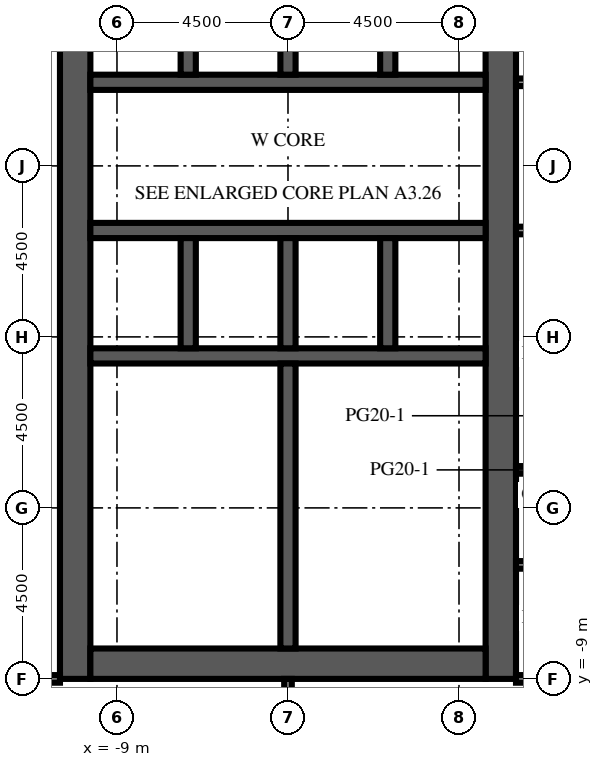
"""IFC4 building model, lengths in metres.
Left out: names, types, materials, properties, quantities, classifications, styles, units other than length and angle.
Written with IfcOpenShell. Run it as: python <this file> out.ifc"""

import sys

from ifc_helpers import new_model, si_unit, direction, frame, frame_2d, origin, place, context, subcontext, project, spatial, rectangle, extrude, element, fill, save


model = new_model("IFC4")
c1 = context("Model", 3, precision=1e-05, world=origin(), true_north=direction((0.0, 1.0)))
c2 = subcontext(c1, "Body", "Model", "MODEL_VIEW")
j1 = project(units=[si_unit("LENGTHUNIT", "METRE"), si_unit("PLANEANGLEUNIT", "RADIAN")], contexts=[c1])
p1 = place(None, origin())
s1 = spatial("IfcSite", under=j1, at=p1, CompositionType="ELEMENT")
p2 = place(p1, origin())
s2 = spatial("IfcBuilding", under=s1, at=p2, CompositionType="ELEMENT")
p3 = place(p2, frame((0.0, 0.0, 173.2)))
s3 = spatial("IfcBuildingStorey", under=s2, at=p3, CompositionType="ELEMENT", Elevation=173.2)
p4 = place(p3, frame((-10.1, -9.0, 0.0), z_axis=(0.0, 0.0, 1.0), x_axis=(0.0, 1.0, 0.0)))
e1 = element("IfcWall", 1, at=p4, inside=s3, PredefinedType="SHEAR", context=c2, shape_type="SweptSolid", body=[
    extrude(rectangle(XDim=27.5, YDim=0.8, at=frame_2d((13.75, 0.0))), origin(), (0.0, 0.0, 1.0), 4.1),
])
p5 = place(p4, frame((12.55, 0.0, 0.0)))
e2 = element("IfcOpeningElement", 2, at=p5, cuts=e1, PredefinedType="OPENING", context=c2, shape_type="SweptSolid", body=[
    extrude(rectangle(XDim=2.4, YDim=2.4, at=frame_2d((1.2, 1.2))), frame((0.0, 0.41, 0.0), z_axis=(0.0, -1.0, 0.0), x_axis=(1.0, 0.0, 0.0)), (0.0, 0.0, 1.0), 0.82),
])
p6 = place(p4, frame((6.825, 0.0, 0.0)))
e3 = element("IfcOpeningElement", 3, at=p6, cuts=e1, PredefinedType="OPENING", context=c2, shape_type="SweptSolid", body=[
    extrude(rectangle(XDim=1.2, YDim=2.1, at=frame_2d((0.6, 1.05))), frame((0.0, 0.41, 0.0), z_axis=(0.0, -1.0, 0.0), x_axis=(1.0, 0.0, 0.0)), (0.0, 0.0, 1.0), 0.82),
])
p7 = place(p4, frame((19.475, 0.0, 0.0)))
e4 = element("IfcOpeningElement", 4, at=p7, cuts=e1, PredefinedType="OPENING", context=c2, shape_type="SweptSolid", body=[
    extrude(rectangle(XDim=1.2, YDim=2.1, at=frame_2d((0.6, 1.05))), frame((0.0, 0.41, 0.0), z_axis=(0.0, -1.0, 0.0), x_axis=(1.0, 0.0, 0.0)), (0.0, 0.0, 1.0), 0.82),
])
p8 = place(p3, frame((1.1, -9.0, 0.0), z_axis=(0.0, 0.0, 1.0), x_axis=(0.0, 1.0, 0.0)))
e5 = element("IfcWall", 5, at=p8, inside=s3, PredefinedType="SHEAR", context=c2, shape_type="SweptSolid", body=[
    extrude(rectangle(XDim=27.5, YDim=0.8, at=frame_2d((13.75, 0.0))), origin(), (0.0, 0.0, 1.0), 4.1),
])
p9 = place(p8, frame((12.55, 0.0, 0.0)))
e6 = element("IfcOpeningElement", 6, at=p9, cuts=e5, PredefinedType="OPENING", context=c2, shape_type="SweptSolid", body=[
    extrude(rectangle(XDim=2.4, YDim=2.4, at=frame_2d((1.2, 1.2))), frame((0.0, 0.41, 0.0), z_axis=(0.0, -1.0, 0.0), x_axis=(1.0, 0.0, 0.0)), (0.0, 0.0, 1.0), 0.82),
])
p10 = place(p8, frame((3.95, 0.0, 0.0)))
e7 = element("IfcOpeningElement", 7, at=p10, cuts=e5, PredefinedType="OPENING", context=c2, shape_type="SweptSolid", body=[
    extrude(rectangle(XDim=1.2, YDim=2.1, at=frame_2d((0.6, 1.05))), frame((0.0, 0.41, 0.0), z_axis=(0.0, -1.0, 0.0), x_axis=(1.0, 0.0, 0.0)), (0.0, 0.0, 1.0), 0.82),
])
p11 = place(p8, frame((22.35, 0.0, 0.0)))
e8 = element("IfcOpeningElement", 8, at=p11, cuts=e5, PredefinedType="OPENING", context=c2, shape_type="SweptSolid", body=[
    extrude(rectangle(XDim=1.2, YDim=2.1, at=frame_2d((0.6, 1.05))), frame((0.0, 0.41, 0.0), z_axis=(0.0, -1.0, 0.0), x_axis=(1.0, 0.0, 0.0)), (0.0, 0.0, 1.0), 0.82),
])
p12 = place(p3, frame((-9.7, -8.6, 0.0), z_axis=(0.0, 0.0, 1.0), x_axis=(1.0, 0.0, 0.0)))
e9 = element("IfcWall", 9, at=p12, inside=s3, PredefinedType="SHEAR", context=c2, shape_type="SweptSolid", body=[
    extrude(rectangle(XDim=10.4, YDim=0.8, at=frame_2d((5.2, 0.0))), origin(), (0.0, 0.0, 1.0), 4.1),
])
p13 = place(p3, frame((-9.7, -0.5, 0.0), z_axis=(0.0, 0.0, 1.0), x_axis=(1.0, 0.0, 0.0)))
e10 = element("IfcWall", 10, at=p13, inside=s3, PredefinedType="SHEAR", context=c2, shape_type="SweptSolid", body=[
    extrude(rectangle(XDim=10.4, YDim=0.4, at=frame_2d((5.2, 0.0))), origin(), (0.0, 0.0, 1.0), 4.1),
])
p14 = place(p3, frame((-9.7, 2.8, 0.0), z_axis=(0.0, 0.0, 1.0), x_axis=(1.0, 0.0, 0.0)))
e11 = element("IfcWall", 11, at=p14, inside=s3, PredefinedType="SHEAR", context=c2, shape_type="SweptSolid", body=[
    extrude(rectangle(XDim=10.4, YDim=0.4, at=frame_2d((5.2, 0.0))), origin(), (0.0, 0.0, 1.0), 4.1),
])
p15 = place(p14, frame((0.738, 0.0, 0.0)))
e12 = element("IfcOpeningElement", 12, at=p15, cuts=e11, PredefinedType="OPENING", context=c2, shape_type="SweptSolid", body=[
    extrude(rectangle(XDim=1.1, YDim=2.1, at=frame_2d((0.55, 1.05))), frame((0.0, 0.21, 0.0), z_axis=(0.0, -1.0, 0.0), x_axis=(1.0, 0.0, 0.0)), (0.0, 0.0, 1.0), 0.42),
])
p16 = place(p14, frame((3.337, 0.0, 0.0)))
e13 = element("IfcOpeningElement", 13, at=p16, cuts=e11, PredefinedType="OPENING", context=c2, shape_type="SweptSolid", body=[
    extrude(rectangle(XDim=1.1, YDim=2.1, at=frame_2d((0.55, 1.05))), frame((0.0, 0.21, 0.0), z_axis=(0.0, -1.0, 0.0), x_axis=(1.0, 0.0, 0.0)), (0.0, 0.0, 1.0), 0.42),
])
p17 = place(p14, frame((6.012, 0.0, 0.0)))
e14 = element("IfcOpeningElement", 14, at=p17, cuts=e11, PredefinedType="OPENING", context=c2, shape_type="SweptSolid", body=[
    extrude(rectangle(XDim=1.0, YDim=2.1, at=frame_2d((0.5, 1.05))), frame((0.0, 0.21, 0.0), z_axis=(0.0, -1.0, 0.0), x_axis=(1.0, 0.0, 0.0)), (0.0, 0.0, 1.0), 0.42),
])
p18 = place(p14, frame((8.613, 0.0, 0.0)))
e15 = element("IfcOpeningElement", 15, at=p18, cuts=e11, PredefinedType="OPENING", context=c2, shape_type="SweptSolid", body=[
    extrude(rectangle(XDim=1.0, YDim=2.1, at=frame_2d((0.5, 1.05))), frame((0.0, 0.21, 0.0), z_axis=(0.0, -1.0, 0.0), x_axis=(1.0, 0.0, 0.0)), (0.0, 0.0, 1.0), 0.42),
])
p19 = place(p3, frame((-9.7, 6.7, 0.0), z_axis=(0.0, 0.0, 1.0), x_axis=(1.0, 0.0, 0.0)))
e16 = element("IfcWall", 16, at=p19, inside=s3, PredefinedType="SHEAR", context=c2, shape_type="SweptSolid", body=[
    extrude(rectangle(XDim=10.4, YDim=0.4, at=frame_2d((5.2, 0.0))), origin(), (0.0, 0.0, 1.0), 4.1),
])
p20 = place(p19, frame((3.337, 0.0, 0.0)))
e17 = element("IfcOpeningElement", 17, at=p20, cuts=e16, PredefinedType="OPENING", context=c2, shape_type="SweptSolid", body=[
    extrude(rectangle(XDim=1.1, YDim=2.1, at=frame_2d((0.55, 1.05))), frame((0.0, 0.21, 0.0), z_axis=(0.0, -1.0, 0.0), x_axis=(1.0, 0.0, 0.0)), (0.0, 0.0, 1.0), 0.42),
])
p21 = place(p19, frame((5.962, 0.0, 0.0)))
e18 = element("IfcOpeningElement", 18, at=p21, cuts=e16, PredefinedType="OPENING", context=c2, shape_type="SweptSolid", body=[
    extrude(rectangle(XDim=1.1, YDim=2.1, at=frame_2d((0.55, 1.05))), frame((0.0, 0.21, 0.0), z_axis=(0.0, -1.0, 0.0), x_axis=(1.0, 0.0, 0.0)), (0.0, 0.0, 1.0), 0.42),
])
p22 = place(p19, frame((8.663, 0.0, 0.0)))
e19 = element("IfcOpeningElement", 19, at=p22, cuts=e16, PredefinedType="OPENING", context=c2, shape_type="SweptSolid", body=[
    extrude(rectangle(XDim=1.1, YDim=2.1, at=frame_2d((0.55, 1.05))), frame((0.0, 0.21, 0.0), z_axis=(0.0, -1.0, 0.0), x_axis=(1.0, 0.0, 0.0)), (0.0, 0.0, 1.0), 0.42),
])
p23 = place(p19, frame((0.688, 0.0, 0.0)))
e20 = element("IfcOpeningElement", 20, at=p23, cuts=e16, PredefinedType="OPENING", context=c2, shape_type="SweptSolid", body=[
    extrude(rectangle(XDim=1.0, YDim=2.1, at=frame_2d((0.5, 1.05))), frame((0.0, 0.21, 0.0), z_axis=(0.0, -1.0, 0.0), x_axis=(1.0, 0.0, 0.0)), (0.0, 0.0, 1.0), 0.42),
])
for number, where, z_axis, x_axis in (
    (21, (-7.125, -0.3, 0.0), (0.0, 0.0, 1.0), (0.0, 1.0, 0.0)),
    (22, (-7.125, 6.9, 0.0), (0.0, 0.0, 1.0), (0.0, 1.0, 0.0)),
    (23, (-4.5, -0.3, 0.0), (0.0, 0.0, 1.0), (0.0, 1.0, 0.0)),
    (24, (-4.5, 6.9, 0.0), (0.0, 0.0, 1.0), (0.0, 1.0, 0.0)),
    (25, (-1.875, -0.3, 0.0), (0.0, 0.0, 1.0), (0.0, 1.0, 0.0)),
    (26, (-1.875, 6.9, 0.0), (0.0, 0.0, 1.0), (0.0, 1.0, 0.0)),
):
    element("IfcWall", number, at=place(p3, frame(where, z_axis=z_axis, x_axis=x_axis)), inside=s3, PredefinedType="SHEAR", context=c2, shape_type="SweptSolid", body=[
        extrude(rectangle(XDim=2.9, YDim=0.4, at=frame_2d((1.45, 0.0))), origin(), (0.0, 0.0, 1.0), 4.1),
    ])
p24 = place(p3, frame((-4.5, -8.2, 0.0), z_axis=(0.0, 0.0, 1.0), x_axis=(0.0, 1.0, 0.0)))
e27 = element("IfcWall", 27, at=p24, inside=s3, PredefinedType="SHEAR", context=c2, shape_type="SweptSolid", body=[
    extrude(rectangle(XDim=7.5, YDim=0.4, at=frame_2d((3.75, 0.0))), origin(), (0.0, 0.0, 1.0), 4.1),
])
p25 = place(p3, frame((-0.8, -8.2, 0.0), z_axis=(0.0, 0.0, 1.0), x_axis=(0.0, 1.0, 0.0)))
e28 = element("IfcWall", 28, at=p25, inside=s3, PredefinedType="PARTITIONING", context=c2, shape_type="SweptSolid", body=[
    extrude(rectangle(XDim=2.55, YDim=0.1, at=frame_2d((1.275, 0.0))), origin(), (0.0, 0.0, 1.0), 3.65),
])
p26 = place(p25, frame((0.775, 0.0, 0.0)))
e29 = element("IfcOpeningElement", 29, at=p26, cuts=e28, PredefinedType="OPENING", context=c2, shape_type="SweptSolid", body=[
    extrude(rectangle(XDim=1.0, YDim=2.1, at=frame_2d((0.5, 1.05))), frame((0.0, 0.06, 0.0), z_axis=(0.0, -1.0, 0.0), x_axis=(1.0, 0.0, 0.0)), (0.0, 0.0, 1.0), 0.12),
])
p27 = place(p3, frame((-0.8, -5.65, 0.0), z_axis=(0.0, 0.0, 1.0), x_axis=(0.0, 1.0, 0.0)))
e30 = element("IfcWall", 30, at=p27, inside=s3, PredefinedType="PARTITIONING", context=c2, shape_type="SweptSolid", body=[
    extrude(rectangle(XDim=2.1, YDim=0.1, at=frame_2d((1.05, 0.0))), origin(), (0.0, 0.0, 1.0), 3.65),
])
p28 = place(p27, frame((0.55, 0.0, 0.0)))
e31 = element("IfcOpeningElement", 31, at=p28, cuts=e30, PredefinedType="OPENING", context=c2, shape_type="SweptSolid", body=[
    extrude(rectangle(XDim=1.0, YDim=2.1, at=frame_2d((0.5, 1.05))), frame((0.0, 0.06, 0.0), z_axis=(0.0, -1.0, 0.0), x_axis=(1.0, 0.0, 0.0)), (0.0, 0.0, 1.0), 0.12),
])
p29 = place(p3, frame((-0.8, -3.55, 0.0), z_axis=(0.0, 0.0, 1.0), x_axis=(0.0, 1.0, 0.0)))
e32 = element("IfcWall", 32, at=p29, inside=s3, PredefinedType="PARTITIONING", context=c2, shape_type="SweptSolid", body=[
    extrude(rectangle(XDim=2.85, YDim=0.1, at=frame_2d((1.425, 0.0))), origin(), (0.0, 0.0, 1.0), 3.65),
])
p30 = place(p29, frame((0.925, 0.0, 0.0)))
e33 = element("IfcOpeningElement", 33, at=p30, cuts=e32, PredefinedType="OPENING", context=c2, shape_type="SweptSolid", body=[
    extrude(rectangle(XDim=1.0, YDim=2.1, at=frame_2d((0.5, 1.05))), frame((0.0, 0.06, 0.0), z_axis=(0.0, -1.0, 0.0), x_axis=(1.0, 0.0, 0.0)), (0.0, 0.0, 1.0), 0.12),
])
for number, where, z_axis, x_axis in (
    (34, (-4.3, -5.65, 0.0), (0.0, 0.0, 1.0), (1.0, 0.0, 0.0)),
    (35, (-4.3, -3.55, 0.0), (0.0, 0.0, 1.0), (1.0, 0.0, 0.0)),
):
    element("IfcWall", number, at=place(p3, frame(where, z_axis=z_axis, x_axis=x_axis)), inside=s3, PredefinedType="PARTITIONING", context=c2, shape_type="SweptSolid", body=[
        extrude(rectangle(XDim=3.5, YDim=0.1, at=frame_2d((1.75, 0.0))), origin(), (0.0, 0.0, 1.0), 3.65),
    ])
p31 = place(p3, frame((-4.5, -26.5, 0.0), z_axis=(0.0, 0.0, 1.0), x_axis=(0.0, 1.0, 0.0)))
e36 = element("IfcWall", 36, at=p31, inside=s3, PredefinedType="PARTITIONING", context=c2, shape_type="SweptSolid", body=[
    extrude(rectangle(XDim=17.5, YDim=0.2, at=frame_2d((8.75, 0.0))), origin(), (0.0, 0.0, 1.0), 3.65),
])
p32 = place(p3, frame((-10.5, -9.0, 0.0), z_axis=(0.0, 0.0, 1.0), x_axis=(-1.0, 0.0, 0.0)))
e37 = element("IfcWall", 37, at=p32, inside=s3, PredefinedType="PARTITIONING", context=c2, shape_type="SweptSolid", body=[
    extrude(rectangle(XDim=3.0, YDim=0.2, at=frame_2d((1.5, 0.0))), origin(), (0.0, 0.0, 1.0), 3.65),
])
p33 = place(p32, frame((0.9, 0.0, 0.0)))
e38 = element("IfcOpeningElement", 38, at=p33, cuts=e37, PredefinedType="OPENING", context=c2, shape_type="SweptSolid", body=[
    extrude(rectangle(XDim=1.0, YDim=2.1, at=frame_2d((0.5, 1.05))), frame((0.0, 0.11, 0.0), z_axis=(0.0, -1.0, 0.0), x_axis=(1.0, 0.0, 0.0)), (0.0, 0.0, 1.0), 0.22),
])
p34 = place(p3, frame((6.0, -9.0, 0.0), z_axis=(0.0, 0.0, 1.0), x_axis=(-1.0, 0.0, 0.0)))
e39 = element("IfcWall", 39, at=p34, inside=s3, PredefinedType="PARTITIONING", context=c2, shape_type="SweptSolid", body=[
    extrude(rectangle(XDim=4.5, YDim=0.2, at=frame_2d((2.25, 0.0))), origin(), (0.0, 0.0, 1.0), 3.65),
])
p35 = place(p34, frame((1.15, 0.0, 0.0)))
e40 = element("IfcOpeningElement", 40, at=p35, cuts=e39, PredefinedType="OPENING", context=c2, shape_type="SweptSolid", body=[
    extrude(rectangle(XDim=1.0, YDim=2.1, at=frame_2d((0.5, 1.05))), frame((0.0, 0.11, 0.0), z_axis=(0.0, -1.0, 0.0), x_axis=(1.0, 0.0, 0.0)), (0.0, 0.0, 1.0), 0.22),
])
for number, where, z_axis, x_axis in (
    (41, (1.5, -6.0, 0.0), (0.0, 0.0, 1.0), (1.0, 0.0, 0.0)),
    (42, (1.5, -3.5, 0.0), (0.0, 0.0, 1.0), (1.0, 0.0, 0.0)),
    (43, (1.5, 2.8, 0.0), (0.0, 0.0, 1.0), (1.0, 0.0, 0.0)),
    (44, (1.5, 6.7, 0.0), (0.0, 0.0, 1.0), (1.0, 0.0, 0.0)),
):
    element("IfcWall", number, at=place(p3, frame(where, z_axis=z_axis, x_axis=x_axis)), inside=s3, PredefinedType="PARTITIONING", context=c2, shape_type="SweptSolid", body=[
        extrude(rectangle(XDim=1.5, YDim=0.2, at=frame_2d((0.75, 0.0))), origin(), (0.0, 0.0, 1.0), 3.65),
    ])
p36 = place(p15, origin())
e45 = element("IfcDoor", 45, at=p36, inside=s3, OperationType="DOUBLE_DOOR_SLIDING", PredefinedType="DOOR", context=c2, shape_type="SweptSolid", body=[
    extrude(rectangle(XDim=1.1, YDim=2.1, at=frame_2d((0.55, 1.05))), frame((0.0, 0.025, 0.0), z_axis=(0.0, -1.0, 0.0), x_axis=(1.0, 0.0, 0.0)), (0.0, 0.0, 1.0), 0.05),
])
fill(e12, e45)
p37 = place(p16, origin())
e46 = element("IfcDoor", 46, at=p37, inside=s3, OperationType="DOUBLE_DOOR_SLIDING", PredefinedType="DOOR", context=c2, shape_type="SweptSolid", body=[
    extrude(rectangle(XDim=1.1, YDim=2.1, at=frame_2d((0.55, 1.05))), frame((0.0, 0.025, 0.0), z_axis=(0.0, -1.0, 0.0), x_axis=(1.0, 0.0, 0.0)), (0.0, 0.0, 1.0), 0.05),
])
fill(e13, e46)
p38 = place(p20, origin())
e47 = element("IfcDoor", 47, at=p38, inside=s3, OperationType="DOUBLE_DOOR_SLIDING", PredefinedType="DOOR", context=c2, shape_type="SweptSolid", body=[
    extrude(rectangle(XDim=1.1, YDim=2.1, at=frame_2d((0.55, 1.05))), frame((0.0, 0.025, 0.0), z_axis=(0.0, -1.0, 0.0), x_axis=(1.0, 0.0, 0.0)), (0.0, 0.0, 1.0), 0.05),
])
fill(e17, e47)
p39 = place(p21, origin())
e48 = element("IfcDoor", 48, at=p39, inside=s3, OperationType="DOUBLE_DOOR_SLIDING", PredefinedType="DOOR", context=c2, shape_type="SweptSolid", body=[
    extrude(rectangle(XDim=1.1, YDim=2.1, at=frame_2d((0.55, 1.05))), frame((0.0, 0.025, 0.0), z_axis=(0.0, -1.0, 0.0), x_axis=(1.0, 0.0, 0.0)), (0.0, 0.0, 1.0), 0.05),
])
fill(e18, e48)
p40 = place(p22, origin())
e49 = element("IfcDoor", 49, at=p40, inside=s3, OperationType="DOUBLE_DOOR_SLIDING", PredefinedType="DOOR", context=c2, shape_type="SweptSolid", body=[
    extrude(rectangle(XDim=1.1, YDim=2.1, at=frame_2d((0.55, 1.05))), frame((0.0, 0.025, 0.0), z_axis=(0.0, -1.0, 0.0), x_axis=(1.0, 0.0, 0.0)), (0.0, 0.0, 1.0), 0.05),
])
fill(e19, e49)
p41 = place(p5, origin())
e50 = element("IfcDoor", 50, at=p41, inside=s3, OperationType="DOUBLE_DOOR_DOUBLE_SWING", PredefinedType="DOOR", context=c2, shape_type="SweptSolid", body=[
    extrude(rectangle(XDim=2.4, YDim=2.4, at=frame_2d((1.2, 1.2))), frame((0.0, 0.025, 0.0), z_axis=(0.0, -1.0, 0.0), x_axis=(1.0, 0.0, 0.0)), (0.0, 0.0, 1.0), 0.05),
])
fill(e2, e50)
p42 = place(p9, origin())
e51 = element("IfcDoor", 51, at=p42, inside=s3, OperationType="DOUBLE_DOOR_DOUBLE_SWING", PredefinedType="DOOR", context=c2, shape_type="SweptSolid", body=[
    extrude(rectangle(XDim=2.4, YDim=2.4, at=frame_2d((1.2, 1.2))), frame((0.0, 0.025, 0.0), z_axis=(0.0, -1.0, 0.0), x_axis=(1.0, 0.0, 0.0)), (0.0, 0.0, 1.0), 0.05),
])
fill(e6, e51)
p43 = place(p6, origin())
e52 = element("IfcDoor", 52, at=p43, inside=s3, OperationType="SINGLE_SWING_LEFT", PredefinedType="DOOR", context=c2, shape_type="SweptSolid", body=[
    extrude(rectangle(XDim=1.2, YDim=2.1, at=frame_2d((0.6, 1.05))), frame((0.0, 0.025, 0.0), z_axis=(0.0, -1.0, 0.0), x_axis=(1.0, 0.0, 0.0)), (0.0, 0.0, 1.0), 0.05),
])
fill(e3, e52)
p44 = place(p17, origin())
e53 = element("IfcDoor", 53, at=p44, inside=s3, OperationType="SINGLE_SWING_LEFT", PredefinedType="DOOR", context=c2, shape_type="SweptSolid", body=[
    extrude(rectangle(XDim=1.0, YDim=2.1, at=frame_2d((0.5, 1.05))), frame((0.0, 0.025, 0.0), z_axis=(0.0, -1.0, 0.0), x_axis=(1.0, 0.0, 0.0)), (0.0, 0.0, 1.0), 0.05),
])
fill(e14, e53)
p45 = place(p18, origin())
e54 = element("IfcDoor", 54, at=p45, inside=s3, OperationType="SINGLE_SWING_RIGHT", PredefinedType="DOOR", context=c2, shape_type="SweptSolid", body=[
    extrude(rectangle(XDim=1.0, YDim=2.1, at=frame_2d((0.5, 1.05))), frame((0.0, 0.025, 0.0), z_axis=(0.0, -1.0, 0.0), x_axis=(1.0, 0.0, 0.0)), (0.0, 0.0, 1.0), 0.05),
])
fill(e15, e54)
p46 = place(p23, origin())
e55 = element("IfcDoor", 55, at=p46, inside=s3, OperationType="SINGLE_SWING_LEFT", PredefinedType="DOOR", context=c2, shape_type="SweptSolid", body=[
    extrude(rectangle(XDim=1.0, YDim=2.1, at=frame_2d((0.5, 1.05))), frame((0.0, 0.025, 0.0), z_axis=(0.0, -1.0, 0.0), x_axis=(1.0, 0.0, 0.0)), (0.0, 0.0, 1.0), 0.05),
])
fill(e20, e55)
p47 = place(p10, origin())
e56 = element("IfcDoor", 56, at=p47, inside=s3, OperationType="SINGLE_SWING_LEFT", PredefinedType="DOOR", context=c2, shape_type="SweptSolid", body=[
    extrude(rectangle(XDim=1.2, YDim=2.1, at=frame_2d((0.6, 1.05))), frame((0.0, 0.375, 0.0), z_axis=(0.0, -1.0, 0.0), x_axis=(1.0, 0.0, 0.0)), (0.0, 0.0, 1.0), 0.05),
])
fill(e7, e56)
p48 = place(p26, origin())
e57 = element("IfcDoor", 57, at=p48, inside=s3, OperationType="SINGLE_SWING_RIGHT", PredefinedType="DOOR", context=c2, shape_type="SweptSolid", body=[
    extrude(rectangle(XDim=1.0, YDim=2.1, at=frame_2d((0.5, 1.05))), frame((0.0, 0.025, 0.0), z_axis=(0.0, -1.0, 0.0), x_axis=(1.0, 0.0, 0.0)), (0.0, 0.0, 1.0), 0.05),
])
fill(e29, e57)
p49 = place(p28, origin())
e58 = element("IfcDoor", 58, at=p49, inside=s3, OperationType="SINGLE_SWING_LEFT", PredefinedType="DOOR", context=c2, shape_type="SweptSolid", body=[
    extrude(rectangle(XDim=1.0, YDim=2.1, at=frame_2d((0.5, 1.05))), frame((0.0, 0.025, 0.0), z_axis=(0.0, -1.0, 0.0), x_axis=(1.0, 0.0, 0.0)), (0.0, 0.0, 1.0), 0.05),
])
fill(e31, e58)
p50 = place(p30, origin())
e59 = element("IfcDoor", 59, at=p50, inside=s3, OperationType="SINGLE_SWING_RIGHT", PredefinedType="DOOR", context=c2, shape_type="SweptSolid", body=[
    extrude(rectangle(XDim=1.0, YDim=2.1, at=frame_2d((0.5, 1.05))), frame((0.0, 0.025, 0.0), z_axis=(0.0, -1.0, 0.0), x_axis=(1.0, 0.0, 0.0)), (0.0, 0.0, 1.0), 0.05),
])
fill(e33, e59)
save(model, sys.argv[1])
